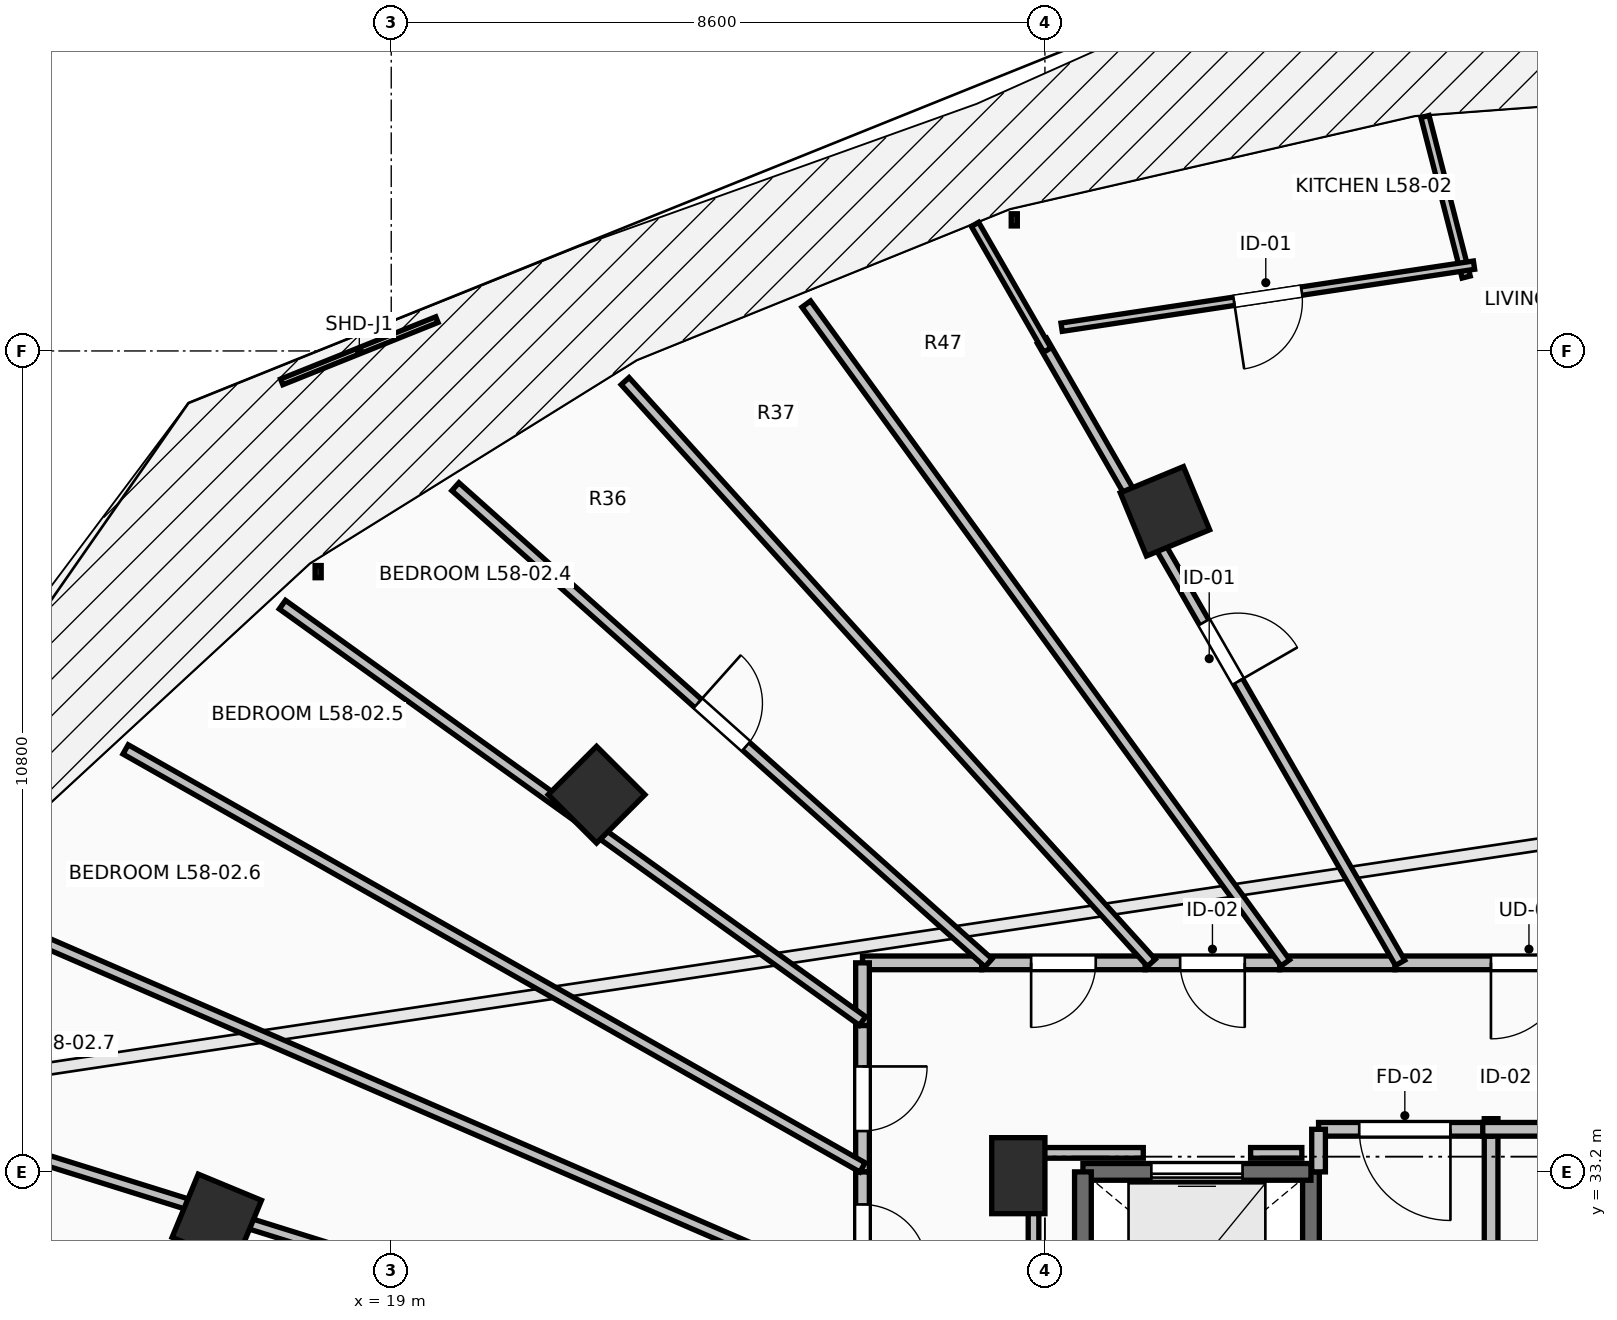
"""IFC4 building model, lengths in metres.
Left out: names, types, materials, properties, quantities, classifications, styles, units other than length and angle.
Written with IfcOpenShell. Run it as: python <this file> out.ifc"""

import sys

from ifc_helpers import new_model, si_unit, direction, frame, frame_2d, origin, origin_2d, place, context, subcontext, project, spatial, rectangle, extrude, element, fill, save


model = new_model("IFC4")
c1 = context("Model", 3, precision=1e-05, world=origin(), true_north=direction((0.0, 1.0)))
c2 = subcontext(c1, "Body", "Model", "MODEL_VIEW")
j1 = project(units=[si_unit("LENGTHUNIT", "METRE"), si_unit("PLANEANGLEUNIT", "RADIAN")], contexts=[c1])
p1 = place(None, origin())
s1 = spatial("IfcSite", under=j1, at=p1, CompositionType="ELEMENT")
p2 = place(p1, origin())
s2 = spatial("IfcBuilding", under=s1, at=p2, CompositionType="ELEMENT")
p3 = place(p2, frame((0.0, 0.0, 214.3)))
s3 = spatial("IfcBuildingStorey", under=s2, at=p3, CompositionType="ELEMENT", Elevation=214.3)
for number, where, z_axis, x_axis in (
    (1, (29.179, 41.891, 0.0), (0.0, 0.0, 1.0), (-0.383, 0.924, 0.0)),
    (2, (21.701, 38.162, 0.0), (0.0, 0.0, 1.0), (-0.707, 0.707, 0.0)),
    (3, (16.705, 32.582, 0.0), (0.0, 0.0, 1.0), (-0.924, 0.383, 0.0)),
):
    element("IfcColumn", number, at=place(p3, frame(where, z_axis=z_axis, x_axis=x_axis)), inside=s3, PredefinedType="COLUMN", context=c2, shape_type="SweptSolid", body=[
        extrude(rectangle(XDim=0.9, YDim=0.9, at=origin_2d()), origin(), (0.0, 0.0, 1.0), 3.55),
    ])
p4 = place(p3, frame((27.25, 33.15, 0.0), z_axis=(0.0, 0.0, 1.0), x_axis=(1.0, 0.0, 0.0)))
e4 = element("IfcColumn", 4, at=p4, inside=s3, PredefinedType="PILASTER", context=c2, shape_type="SweptSolid", body=[
    extrude(rectangle(XDim=0.7, YDim=1.0, at=origin_2d()), origin(), (0.0, 0.0, 1.0), 3.55),
])
p5 = place(p3, frame((31.1, 30.7, 0.0), z_axis=(0.0, 0.0, 1.0), x_axis=(0.0, 1.0, 0.0)))
e5 = element("IfcWall", 5, at=p5, inside=s3, PredefinedType="SOLIDWALL", context=c2, shape_type="SweptSolid", body=[
    extrude(rectangle(XDim=2.5, YDim=0.22, at=frame_2d((1.25, 0.0))), origin(), (0.0, 0.0, 1.0), 3.29),
])
p6 = place(p3, frame((31.1, 33.2, 0.0), z_axis=(0.0, 0.0, 1.0), x_axis=(-1.0, 0.0, 0.0)))
e6 = element("IfcWall", 6, at=p6, inside=s3, PredefinedType="SOLIDWALL", context=c2, shape_type="SweptSolid", body=[
    extrude(rectangle(XDim=3.0, YDim=0.22, at=frame_2d((1.5, 0.0))), origin(), (0.0, 0.0, 1.0), 3.29),
])
p7 = place(p6, frame((0.9, 0.0, 0.0)))
e7 = element("IfcOpeningElement", 7, at=p7, cuts=e6, PredefinedType="OPENING", context=c2, shape_type="SweptSolid", body=[
    extrude(rectangle(XDim=1.2, YDim=2.2, at=frame_2d((0.6, 1.1))), frame((0.0, 0.125, 0.0), z_axis=(0.0, -1.0, 0.0), x_axis=(1.0, 0.0, 0.0)), (0.0, 0.0, 1.0), 0.25),
])
p8 = place(p3, frame((28.1, 33.2, 0.0), z_axis=(0.0, 0.0, 1.0), x_axis=(0.0, -1.0, 0.0)))
e8 = element("IfcWall", 8, at=p8, inside=s3, PredefinedType="SOLIDWALL", context=c2, shape_type="SweptSolid", body=[
    extrude(rectangle(XDim=2.5, YDim=0.22, at=frame_2d((1.25, 0.0))), origin(), (0.0, 0.0, 1.0), 3.29),
])
p9 = place(p3, frame((33.47, 30.34, 0.0), z_axis=(0.0, 0.0, 1.0), x_axis=(0.0, 1.0, 0.0)))
e9 = element("IfcWall", 9, at=p9, inside=s3, PredefinedType="PARTITIONING", context=c2, shape_type="SweptSolid", body=[
    extrude(rectangle(XDim=3.56, YDim=0.18, at=frame_2d((1.78, 0.0))), origin(), (0.0, 0.0, 1.0), 3.29),
])
p10 = place(p3, frame((33.47, 33.76, 0.0), z_axis=(0.0, 0.0, 1.0), x_axis=(-1.0, 0.0, 0.0)))
e10 = element("IfcWall", 10, at=p10, inside=s3, PredefinedType="PARTITIONING", context=c2, shape_type="SweptSolid", body=[
    extrude(rectangle(XDim=2.27, YDim=0.18, at=frame_2d((1.135, 0.0))), origin(), (0.0, 0.0, 1.0), 3.29),
])
p11 = place(p10, frame((0.535, 0.0, 0.0)))
e11 = element("IfcOpeningElement", 11, at=p11, cuts=e10, PredefinedType="OPENING", context=c2, shape_type="SweptSolid", body=[
    extrude(rectangle(XDim=1.2, YDim=2.15, at=frame_2d((0.6, 1.075))), frame((0.0, 0.105, 0.0), z_axis=(0.0, -1.0, 0.0), x_axis=(1.0, 0.0, 0.0)), (0.0, 0.0, 1.0), 0.21),
])
p12 = place(p3, frame((31.2, 33.76, 0.0), z_axis=(0.0, 0.0, 1.0), x_axis=(0.0, -1.0, 0.0)))
e12 = element("IfcWall", 12, at=p12, inside=s3, PredefinedType="PARTITIONING", context=c2, shape_type="SweptSolid", body=[
    extrude(rectangle(XDim=0.56, YDim=0.18, at=frame_2d((0.28, 0.0))), origin(), (0.0, 0.0, 1.0), 3.29),
])
p13 = place(p3, frame((35.69, 33.76, 0.0), z_axis=(0.0, 0.0, 1.0), x_axis=(-1.0, 0.0, 0.0)))
e13 = element("IfcWall", 13, at=p13, inside=s3, PredefinedType="PARTITIONING", context=c2, shape_type="SweptSolid", body=[
    extrude(rectangle(XDim=2.33, YDim=0.18, at=frame_2d((1.165, 0.0))), origin(), (0.0, 0.0, 1.0), 3.29),
])
p14 = place(p13, frame((0.74, 0.0, 0.0)))
e14 = element("IfcOpeningElement", 14, at=p14, cuts=e13, PredefinedType="OPENING", context=c2, shape_type="SweptSolid", body=[
    extrude(rectangle(XDim=0.85, YDim=2.1, at=frame_2d((0.425, 1.05))), frame((0.0, 0.105, 0.0), z_axis=(0.0, -1.0, 0.0), x_axis=(1.0, 0.0, 0.0)), (0.0, 0.0, 1.0), 0.21),
])
p15 = place(p3, frame((35.732, 35.95, 0.0), z_axis=(0.0, 0.0, 1.0), x_axis=(-1.0, 0.0, 0.0)))
e15 = element("IfcWall", 15, at=p15, inside=s3, PredefinedType="PARTITIONING", context=c2, shape_type="SweptSolid", body=[
    extrude(rectangle(XDim=3.528, YDim=0.18, at=frame_2d((1.764, 0.0))), origin(), (0.0, 0.0, 1.0), 2.979),
])
p16 = place(p15, frame((1.264, 0.0, 0.0)))
e16 = element("IfcOpeningElement", 16, at=p16, cuts=e15, PredefinedType="OPENING", context=c2, shape_type="SweptSolid", body=[
    extrude(rectangle(XDim=1.0, YDim=2.15, at=frame_2d((0.5, 1.075))), frame((0.0, 0.105, 0.0), z_axis=(0.0, -1.0, 0.0), x_axis=(1.0, 0.0, 0.0)), (0.0, 0.0, 1.0), 0.21),
])
p17 = place(p3, frame((32.204, 35.95, 0.0), z_axis=(0.0, 0.0, 1.0), x_axis=(-1.0, 0.0, 0.0)))
e17 = element("IfcWall", 17, at=p17, inside=s3, PredefinedType="PARTITIONING", context=c2, shape_type="SweptSolid", body=[
    extrude(rectangle(XDim=1.515, YDim=0.18, at=frame_2d((0.758, 0.0))), origin(), (0.0, 0.0, 1.0), 3.29),
])
p18 = place(p3, frame((30.689, 35.95, 0.0), z_axis=(0.0, 0.0, 1.0), x_axis=(-1.0, 0.0, 0.0)))
e18 = element("IfcWall", 18, at=p18, inside=s3, PredefinedType="PARTITIONING", context=c2, shape_type="SweptSolid", body=[
    extrude(rectangle(XDim=1.77, YDim=0.18, at=frame_2d((0.885, 0.0))), origin(), (0.0, 0.0, 1.0), 2.482),
])
p19 = place(p18, frame((0.46, 0.0, 0.0)))
e19 = element("IfcOpeningElement", 19, at=p19, cuts=e18, PredefinedType="OPENING", context=c2, shape_type="SweptSolid", body=[
    extrude(rectangle(XDim=0.85, YDim=2.1, at=frame_2d((0.425, 1.05))), frame((0.0, 0.105, 0.0), z_axis=(0.0, -1.0, 0.0), x_axis=(1.0, 0.0, 0.0)), (0.0, 0.0, 1.0), 0.21),
])
p20 = place(p3, frame((28.919, 35.95, 0.0), z_axis=(0.0, 0.0, 1.0), x_axis=(-1.0, 0.0, 0.0)))
e20 = element("IfcWall", 20, at=p20, inside=s3, PredefinedType="PARTITIONING", context=c2, shape_type="SweptSolid", body=[
    extrude(rectangle(XDim=2.151, YDim=0.18, at=frame_2d((1.075, 0.0))), origin(), (0.0, 0.0, 1.0), 2.482),
])
p21 = place(p20, frame((0.65, 0.0, 0.0)))
e21 = element("IfcOpeningElement", 21, at=p21, cuts=e20, PredefinedType="OPENING", context=c2, shape_type="SweptSolid", body=[
    extrude(rectangle(XDim=0.85, YDim=2.1, at=frame_2d((0.425, 1.05))), frame((0.0, 0.105, 0.0), z_axis=(0.0, -1.0, 0.0), x_axis=(1.0, 0.0, 0.0)), (0.0, 0.0, 1.0), 0.21),
])
p22 = place(p3, frame((26.768, 35.95, 0.0), z_axis=(0.0, 0.0, 1.0), x_axis=(-1.0, 0.0, 0.0)))
e22 = element("IfcWall", 22, at=p22, inside=s3, PredefinedType="PARTITIONING", context=c2, shape_type="SweptSolid", body=[
    extrude(rectangle(XDim=1.568, YDim=0.18, at=frame_2d((0.784, 0.0))), origin(), (0.0, 0.0, 1.0), 3.29),
])
p23 = place(p3, frame((25.2, 35.95, 0.0), z_axis=(0.0, 0.0, 1.0), x_axis=(0.0, -1.0, 0.0)))
e23 = element("IfcWall", 23, at=p23, inside=s3, PredefinedType="PARTITIONING", context=c2, shape_type="SweptSolid", body=[
    extrude(rectangle(XDim=0.825, YDim=0.18, at=frame_2d((0.413, 0.0))), origin(), (0.0, 0.0, 1.0), 2.482),
])
p24 = place(p3, frame((25.2, 35.125, 0.0), z_axis=(0.0, 0.0, 1.0), x_axis=(0.0, -1.0, 0.0)))
e24 = element("IfcWall", 24, at=p24, inside=s3, PredefinedType="PARTITIONING", context=c2, shape_type="SweptSolid", body=[
    extrude(rectangle(XDim=1.926, YDim=0.18, at=frame_2d((0.963, 0.0))), origin(), (0.0, 0.0, 1.0), 2.482),
])
p25 = place(p24, frame((0.538, 0.0, 0.0)))
e25 = element("IfcOpeningElement", 25, at=p25, cuts=e24, PredefinedType="OPENING", context=c2, shape_type="SweptSolid", body=[
    extrude(rectangle(XDim=0.85, YDim=2.1, at=frame_2d((0.425, 1.05))), frame((0.0, 0.105, 0.0), z_axis=(0.0, -1.0, 0.0), x_axis=(1.0, 0.0, 0.0)), (0.0, 0.0, 1.0), 0.21),
])
p26 = place(p3, frame((25.2, 33.199, 0.0), z_axis=(0.0, 0.0, 1.0), x_axis=(0.0, -1.0, 0.0)))
e26 = element("IfcWall", 26, at=p26, inside=s3, PredefinedType="PARTITIONING", context=c2, shape_type="SweptSolid", body=[
    extrude(rectangle(XDim=1.705, YDim=0.18, at=frame_2d((0.853, 0.0))), origin(), (0.0, 0.0, 1.0), 2.979),
])
p27 = place(p26, frame((0.427, 0.0, 0.0)))
e27 = element("IfcOpeningElement", 27, at=p27, cuts=e26, PredefinedType="OPENING", context=c2, shape_type="SweptSolid", body=[
    extrude(rectangle(XDim=0.85, YDim=2.1, at=frame_2d((0.425, 1.05))), frame((0.0, 0.105, 0.0), z_axis=(0.0, -1.0, 0.0), x_axis=(1.0, 0.0, 0.0)), (0.0, 0.0, 1.0), 0.21),
])
p28 = place(p3, frame((32.6, 47.085, 0.0), z_axis=(0.0, 0.0, 1.0), x_axis=(0.248431915259, -0.96864936044, 0.0)))
e28 = element("IfcWall", 28, at=p28, inside=s3, PredefinedType="PARTITIONING", context=c2, shape_type="SweptSolid", body=[
    extrude(rectangle(XDim=2.181, YDim=0.11, at=frame_2d((1.09, 0.0))), origin(), (0.0, 0.0, 1.0), 3.29),
])
p29 = place(p3, frame((33.245, 45.129, 0.0), z_axis=(0.0, 0.0, 1.0), x_axis=(-0.988861815895, -0.148836517916, 0.0)))
e29 = element("IfcWall", 29, at=p29, inside=s3, PredefinedType="PARTITIONING", context=c2, shape_type="SweptSolid", body=[
    extrude(rectangle(XDim=5.487, YDim=0.11, at=frame_2d((2.743, 0.0))), origin(), (0.0, 0.0, 1.0), 3.29),
])
p30 = place(p29, frame((2.293, 0.0, 0.0)))
e30 = element("IfcOpeningElement", 30, at=p30, cuts=e29, PredefinedType="OPENING", context=c2, shape_type="SweptSolid", body=[
    extrude(rectangle(XDim=0.9, YDim=2.1, at=frame_2d((0.45, 1.05))), frame((0.0, 0.07, 0.0), z_axis=(0.0, -1.0, 0.0), x_axis=(1.0, 0.0, 0.0)), (0.0, 0.0, 1.0), 0.14),
])
p31 = place(p3, frame((27.562, 44.133, 0.0), z_axis=(0.0, 0.0, 1.0), x_axis=(0.498920898859, -0.866647527361, 0.0)))
e31 = element("IfcWall", 31, at=p31, inside=s3, PredefinedType="PARTITIONING", context=c2, shape_type="SweptSolid", body=[
    extrude(rectangle(XDim=9.442, YDim=0.14, at=frame_2d((4.721, 0.0))), origin(), (0.0, 0.0, 1.0), 2.482),
])
p32 = place(p31, frame((4.271, 0.0, 0.0)))
e32 = element("IfcOpeningElement", 32, at=p32, cuts=e31, PredefinedType="OPENING", context=c2, shape_type="SweptSolid", body=[
    extrude(rectangle(XDim=0.9, YDim=2.1, at=frame_2d((0.45, 1.05))), frame((0.0, 0.085, 0.0), z_axis=(0.0, -1.0, 0.0), x_axis=(1.0, 0.0, 0.0)), (0.0, 0.0, 1.0), 0.17),
])
p33 = place(p3, frame((26.68, 45.665, 0.0), z_axis=(0.0, 0.0, 1.0), x_axis=(0.498810083909, -0.866711313062, 0.0)))
e33 = element("IfcWall", 33, at=p33, inside=s3, PredefinedType="PARTITIONING", context=c2, shape_type="SweptSolid", body=[
    extrude(rectangle(XDim=1.908, YDim=0.11, at=frame_2d((0.954, 0.0))), origin(), (0.0, 0.0, 1.0), 3.29),
])
p34 = place(p3, frame((24.46, 44.617, 0.0), z_axis=(0.0, 0.0, 1.0), x_axis=(0.588154087929, -0.808748891098, 0.0)))
e34 = element("IfcWall", 34, at=p34, inside=s3, PredefinedType="PARTITIONING", context=c2, shape_type="SweptSolid", body=[
    extrude(rectangle(XDim=10.717, YDim=0.14, at=frame_2d((5.358, 0.0))), origin(), (0.0, 0.0, 1.0), 2.482),
])
p35 = place(p3, frame((22.077, 43.603, 0.0), z_axis=(0.0, 0.0, 1.0), x_axis=(0.670853853748, -0.741589581177, 0.0)))
e35 = element("IfcWall", 35, at=p35, inside=s3, PredefinedType="PARTITIONING", context=c2, shape_type="SweptSolid", body=[
    extrude(rectangle(XDim=10.32, YDim=0.14, at=frame_2d((5.16, 0.0))), origin(), (0.0, 0.0, 1.0), 2.482),
])
p36 = place(p3, frame((19.844, 42.214, 0.0), z_axis=(0.0, 0.0, 1.0), x_axis=(0.745845988041, -0.666118429502, 0.0)))
e36 = element("IfcWall", 36, at=p36, inside=s3, PredefinedType="PARTITIONING", context=c2, shape_type="SweptSolid", body=[
    extrude(rectangle(XDim=9.404, YDim=0.14, at=frame_2d((4.702, 0.0))), origin(), (0.0, 0.0, 1.0), 2.824),
])
p37 = place(p36, frame((4.277, 0.0, 0.0)))
e37 = element("IfcOpeningElement", 37, at=p37, cuts=e36, PredefinedType="OPENING", context=c2, shape_type="SweptSolid", body=[
    extrude(rectangle(XDim=0.85, YDim=2.1, at=frame_2d((0.425, 1.05))), frame((0.0, 0.085, 0.0), z_axis=(0.0, -1.0, 0.0), x_axis=(1.0, 0.0, 0.0)), (0.0, 0.0, 1.0), 0.17),
])
p38 = place(p3, frame((17.568, 40.662, 0.0), z_axis=(0.0, 0.0, 1.0), x_axis=(0.812435479674, -0.583051105279, 0.0)))
e38 = element("IfcWall", 38, at=p38, inside=s3, PredefinedType="PARTITIONING", context=c2, shape_type="SweptSolid", body=[
    extrude(rectangle(XDim=9.394, YDim=0.14, at=frame_2d((4.697, 0.0))), origin(), (0.0, 0.0, 1.0), 2.482),
])
p39 = place(p3, frame((15.505, 38.758, 0.0), z_axis=(0.0, 0.0, 1.0), x_axis=(0.86982387552, -0.49336236741, 0.0)))
e39 = element("IfcWall", 39, at=p39, inside=s3, PredefinedType="PARTITIONING", context=c2, shape_type="SweptSolid", body=[
    extrude(rectangle(XDim=11.146, YDim=0.14, at=frame_2d((5.573, 0.0))), origin(), (0.0, 0.0, 1.0), 2.824),
])
p40 = place(p3, frame((13.622, 36.578, 0.0), z_axis=(0.0, 0.0, 1.0), x_axis=(0.917357672996, -0.398063939331, 0.0)))
e40 = element("IfcWall", 40, at=p40, inside=s3, PredefinedType="PARTITIONING", context=c2, shape_type="SweptSolid", body=[
    extrude(rectangle(XDim=12.621, YDim=0.14, at=frame_2d((6.311, 0.0))), origin(), (0.0, 0.0, 1.0), 2.824),
])
p41 = place(p3, frame((11.911, 34.152, 0.0), z_axis=(0.0, 0.0, 1.0), x_axis=(0.954494953812, -0.298227066422, 0.0)))
e41 = element("IfcWall", 41, at=p41, inside=s3, PredefinedType="PARTITIONING", context=c2, shape_type="SweptSolid", body=[
    extrude(rectangle(XDim=13.923, YDim=0.14, at=frame_2d((6.961, 0.0))), origin(), (0.0, 0.0, 1.0), 2.482),
])
p42 = place(p3, frame((30.98, 33.45, 0.0), z_axis=(0.0, 0.0, 1.0), x_axis=(-1.0, 0.0, 0.0)))
e42 = element("IfcWall", 42, at=p42, inside=s3, PredefinedType="PARTITIONING", context=c2, shape_type="SweptSolid", body=[
    extrude(rectangle(XDim=0.674, YDim=0.14, at=frame_2d((0.337, 0.0))), origin(), (0.0, 0.0, 1.0), 3.29),
])
p43 = place(p3, frame((28.894, 33.45, 0.0), z_axis=(0.0, 0.0, 1.0), x_axis=(-1.0, 0.0, 0.0)))
e43 = element("IfcWall", 43, at=p43, inside=s3, PredefinedType="PARTITIONING", context=c2, shape_type="SweptSolid", body=[
    extrude(rectangle(XDim=1.444, YDim=0.14, at=frame_2d((0.722, 0.0))), origin(), (0.0, 0.0, 1.0), 2.482),
])
p44 = place(p3, frame((27.45, 33.45, 0.0), z_axis=(0.0, 0.0, 1.0), x_axis=(0.0, -1.0, 0.0)))
e44 = element("IfcWall", 44, at=p44, inside=s3, PredefinedType="PARTITIONING", context=c2, shape_type="SweptSolid", body=[
    extrude(rectangle(XDim=5.254, YDim=0.14, at=frame_2d((2.627, 0.0))), origin(), (0.0, 0.0, 1.0), 2.482),
])
p45 = place(p7, origin())
e45 = element("IfcDoor", 45, at=p45, inside=s3, OperationType="SLIDING_TO_LEFT", PredefinedType="DOOR", context=c2, shape_type="SweptSolid", body=[
    extrude(rectangle(XDim=1.2, YDim=2.2, at=frame_2d((0.6, 1.1))), frame((0.0, 0.025, 0.0), z_axis=(0.0, -1.0, 0.0), x_axis=(1.0, 0.0, 0.0)), (0.0, 0.0, 1.0), 0.05),
])
fill(e7, e45)
p46 = place(p11, origin())
e46 = element("IfcDoor", 46, at=p46, inside=s3, OperationType="SINGLE_SWING_LEFT", PredefinedType="DOOR", context=c2, shape_type="SweptSolid", body=[
    extrude(rectangle(XDim=1.2, YDim=2.15, at=frame_2d((0.6, 1.075))), frame((0.0, 0.025, 0.0), z_axis=(0.0, -1.0, 0.0), x_axis=(1.0, 0.0, 0.0)), (0.0, 0.0, 1.0), 0.05),
])
fill(e11, e46)
p47 = place(p16, origin())
e47 = element("IfcDoor", 47, at=p47, inside=s3, OperationType="SINGLE_SWING_RIGHT", PredefinedType="DOOR", context=c2, shape_type="SweptSolid", body=[
    extrude(rectangle(XDim=1.0, YDim=2.15, at=frame_2d((0.5, 1.075))), frame((0.0, 0.025, 0.0), z_axis=(0.0, -1.0, 0.0), x_axis=(1.0, 0.0, 0.0)), (0.0, 0.0, 1.0), 0.05),
])
fill(e16, e47)
p48 = place(p30, origin())
e48 = element("IfcDoor", 48, at=p48, inside=s3, OperationType="SINGLE_SWING_RIGHT", PredefinedType="DOOR", context=c2, shape_type="SweptSolid", body=[
    extrude(rectangle(XDim=0.9, YDim=2.1, at=frame_2d((0.45, 1.05))), frame((0.0, 0.025, 0.0), z_axis=(0.0, -1.0, 0.0), x_axis=(1.0, 0.0, 0.0)), (0.0, 0.0, 1.0), 0.05),
])
fill(e30, e48)
p49 = place(p32, origin())
e49 = element("IfcDoor", 49, at=p49, inside=s3, OperationType="SINGLE_SWING_RIGHT", PredefinedType="DOOR", context=c2, shape_type="SweptSolid", body=[
    extrude(rectangle(XDim=0.9, YDim=2.1, at=frame_2d((0.45, 1.05))), frame((0.0, 0.025, 0.0), z_axis=(0.0, -1.0, 0.0), x_axis=(1.0, 0.0, 0.0)), (0.0, 0.0, 1.0), 0.05),
])
fill(e32, e49)
p50 = place(p19, origin())
e50 = element("IfcDoor", 50, at=p50, inside=s3, OperationType="SINGLE_SWING_LEFT", PredefinedType="DOOR", context=c2, shape_type="SweptSolid", body=[
    extrude(rectangle(XDim=0.85, YDim=2.1, at=frame_2d((0.425, 1.05))), frame((0.0, 0.025, 0.0), z_axis=(0.0, -1.0, 0.0), x_axis=(1.0, 0.0, 0.0)), (0.0, 0.0, 1.0), 0.05),
])
fill(e19, e50)
p51 = place(p21, origin())
e51 = element("IfcDoor", 51, at=p51, inside=s3, OperationType="SINGLE_SWING_RIGHT", PredefinedType="DOOR", context=c2, shape_type="SweptSolid", body=[
    extrude(rectangle(XDim=0.85, YDim=2.1, at=frame_2d((0.425, 1.05))), frame((0.0, 0.025, 0.0), z_axis=(0.0, -1.0, 0.0), x_axis=(1.0, 0.0, 0.0)), (0.0, 0.0, 1.0), 0.05),
])
fill(e21, e51)
p52 = place(p25, origin())
e52 = element("IfcDoor", 52, at=p52, inside=s3, OperationType="SINGLE_SWING_LEFT", PredefinedType="DOOR", context=c2, shape_type="SweptSolid", body=[
    extrude(rectangle(XDim=0.85, YDim=2.1, at=frame_2d((0.425, 1.05))), frame((0.0, 0.025, 0.0), z_axis=(0.0, -1.0, 0.0), x_axis=(1.0, 0.0, 0.0)), (0.0, 0.0, 1.0), 0.05),
])
fill(e25, e52)
p53 = place(p27, origin())
e53 = element("IfcDoor", 53, at=p53, inside=s3, OperationType="SINGLE_SWING_RIGHT", PredefinedType="DOOR", context=c2, shape_type="SweptSolid", body=[
    extrude(rectangle(XDim=0.85, YDim=2.1, at=frame_2d((0.425, 1.05))), frame((0.0, 0.025, 0.0), z_axis=(0.0, -1.0, 0.0), x_axis=(1.0, 0.0, 0.0)), (0.0, 0.0, 1.0), 0.05),
])
fill(e27, e53)
p54 = place(p37, origin())
e54 = element("IfcDoor", 54, at=p54, inside=s3, OperationType="SINGLE_SWING_LEFT", PredefinedType="DOOR", context=c2, shape_type="SweptSolid", body=[
    extrude(rectangle(XDim=0.85, YDim=2.1, at=frame_2d((0.425, 1.05))), frame((0.0, 0.025, 0.0), z_axis=(0.0, -1.0, 0.0), x_axis=(1.0, 0.0, 0.0)), (0.0, 0.0, 1.0), 0.05),
])
fill(e37, e54)
save(model, sys.argv[1])
